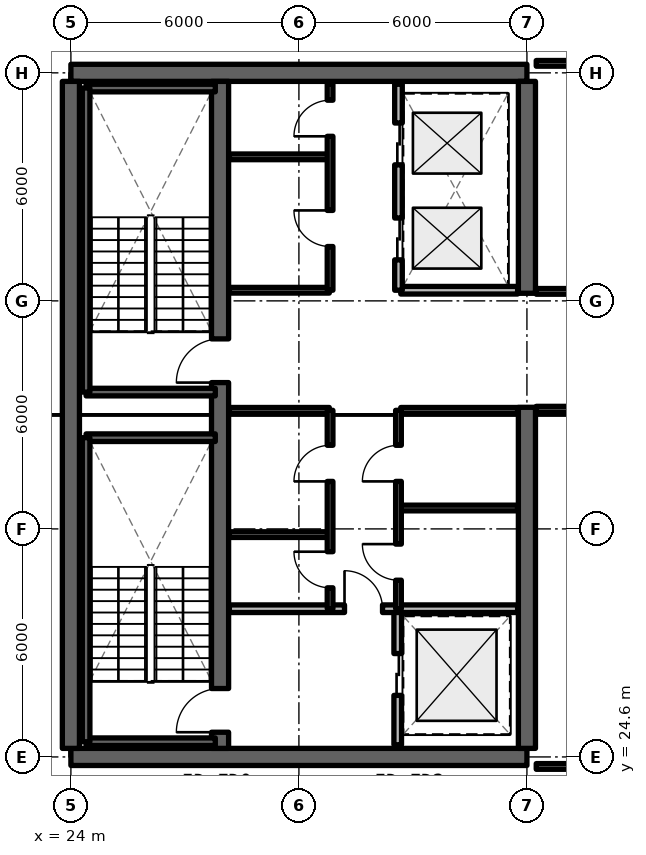
"""IFC4 building model, lengths in metres.
Left out: names, types, materials, properties, quantities, classifications, styles, units other than length and angle.
Written with IfcOpenShell. Run it as: python <this file> out.ifc"""

import sys

from ifc_helpers import new_model, si_unit, direction, frame, frame_2d, origin, place, context, subcontext, project, spatial, rectangle, extrude, element, fill, save


model = new_model("IFC4")
c1 = context("Model", 3, precision=1e-05, world=origin(), true_north=direction((0.0, 1.0)))
c2 = subcontext(c1, "Body", "Model", "MODEL_VIEW")
j1 = project(units=[si_unit("LENGTHUNIT", "METRE"), si_unit("PLANEANGLEUNIT", "RADIAN")], contexts=[c1])
p1 = place(None, origin())
s1 = spatial("IfcSite", under=j1, at=p1, CompositionType="ELEMENT")
p2 = place(p1, origin())
s2 = spatial("IfcBuilding", under=s1, at=p2, CompositionType="ELEMENT")
p3 = place(p2, frame((0.0, 0.0, 208.23)))
s3 = spatial("IfcBuildingStorey", under=s2, at=p3, CompositionType="ELEMENT", Elevation=208.23)
for number, where, z_axis, x_axis in (
    (1, (24.0, 24.6, 0.0), (0.0, 0.0, 1.0), (1.0, 0.0, 0.0)),
    (2, (36.0, 42.6, 0.0), (0.0, 0.0, 1.0), (-1.0, 0.0, 0.0)),
):
    element("IfcWall", number, at=place(p3, frame(where, z_axis=z_axis, x_axis=x_axis)), inside=s3, PredefinedType="SHEAR", context=c2, shape_type="SweptSolid", body=[
        extrude(rectangle(XDim=12.0, YDim=0.45, at=frame_2d((6.0, 0.0))), origin(), (0.0, 0.0, 1.0), 3.63),
    ])
p4 = place(p3, frame((24.0, 24.825, 0.0), z_axis=(0.0, 0.0, 1.0), x_axis=(0.0, 1.0, 0.0)))
e3 = element("IfcWall", 3, at=p4, inside=s3, PredefinedType="SHEAR", context=c2, shape_type="SweptSolid", body=[
    extrude(rectangle(XDim=17.55, YDim=0.45, at=frame_2d((8.775, 0.0))), origin(), (0.0, 0.0, 1.0), 3.63),
])
p5 = place(p3, frame((36.0, 24.825, 0.0), z_axis=(0.0, 0.0, 1.0), x_axis=(0.0, 1.0, 0.0)))
e4 = element("IfcWall", 4, at=p5, inside=s3, PredefinedType="SHEAR", context=c2, shape_type="SweptSolid", body=[
    extrude(rectangle(XDim=8.975, YDim=0.45, at=frame_2d((4.488, 0.0))), origin(), (0.0, 0.0, 1.0), 3.63),
])
p6 = place(p3, frame((36.0, 36.8, 0.0), z_axis=(0.0, 0.0, 1.0), x_axis=(0.0, 1.0, 0.0)))
e5 = element("IfcWall", 5, at=p6, inside=s3, PredefinedType="SHEAR", context=c2, shape_type="SweptSolid", body=[
    extrude(rectangle(XDim=5.575, YDim=0.45, at=frame_2d((2.788, 0.0))), origin(), (0.0, 0.0, 1.0), 3.63),
])
p7 = place(p3, frame((27.925, 24.825, 0.0), z_axis=(0.0, 0.0, 1.0), x_axis=(0.0, 1.0, 0.0)))
e6 = element("IfcWall", 6, at=p7, inside=s3, PredefinedType="SHEAR", context=c2, shape_type="SweptSolid", body=[
    extrude(rectangle(XDim=17.55, YDim=0.45, at=frame_2d((8.775, 0.0))), origin(), (0.0, 0.0, 1.0), 3.63),
])
p8 = place(p7, frame((0.425, 0.0, 0.0)))
e7 = element("IfcOpeningElement", 7, at=p8, cuts=e6, PredefinedType="OPENING", context=c2, shape_type="SweptSolid", body=[
    extrude(rectangle(XDim=1.15, YDim=2.15, at=frame_2d((0.575, 1.075))), frame((0.0, 0.235, 0.0), z_axis=(0.0, -1.0, 0.0), x_axis=(1.0, 0.0, 0.0)), (0.0, 0.0, 1.0), 0.47),
])
p9 = place(p7, frame((9.625, 0.0, 0.0)))
e8 = element("IfcOpeningElement", 8, at=p9, cuts=e6, PredefinedType="OPENING", context=c2, shape_type="SweptSolid", body=[
    extrude(rectangle(XDim=1.15, YDim=2.15, at=frame_2d((0.575, 1.075))), frame((0.0, 0.235, 0.0), z_axis=(0.0, -1.0, 0.0), x_axis=(1.0, 0.0, 0.0)), (0.0, 0.0, 1.0), 0.47),
])
p10 = place(p3, frame((32.6, 24.92, 0.0), z_axis=(0.0, 0.0, 1.0), x_axis=(0.0, 1.0, 0.0)))
e9 = element("IfcWall", 9, at=p10, inside=s3, PredefinedType="SOLIDWALL", context=c2, shape_type="SweptSolid", body=[
    extrude(rectangle(XDim=3.58, YDim=0.2, at=frame_2d((1.79, 0.0))), origin(), (0.0, 0.0, 1.0), 2.63),
])
p11 = place(p10, frame((1.3, 0.0, 0.0)))
e10 = element("IfcOpeningElement", 10, at=p11, cuts=e9, PredefinedType="OPENING", context=c2, shape_type="SweptSolid", body=[
    extrude(rectangle(XDim=1.1, YDim=2.2, at=frame_2d((0.55, 1.1))), frame((0.0, 0.11, 0.0), z_axis=(0.0, -1.0, 0.0), x_axis=(1.0, 0.0, 0.0)), (0.0, 0.0, 1.0), 0.22),
])
p12 = place(p3, frame((28.17, 28.5, 0.0), z_axis=(0.0, 0.0, 1.0), x_axis=(1.0, 0.0, 0.0)))
e11 = element("IfcWall", 11, at=p12, inside=s3, PredefinedType="SOLIDWALL", context=c2, shape_type="SweptSolid", body=[
    extrude(rectangle(XDim=7.585, YDim=0.2, at=frame_2d((3.792, 0.0))), origin(), (0.0, 0.0, 1.0), 2.63),
])
p13 = place(p12, frame((3.03, 0.0, 0.0)))
e12 = element("IfcOpeningElement", 12, at=p13, cuts=e11, PredefinedType="OPENING", context=c2, shape_type="SweptSolid", body=[
    extrude(rectangle(XDim=1.0, YDim=2.15, at=frame_2d((0.5, 1.075))), frame((0.0, 0.11, 0.0), z_axis=(0.0, -1.0, 0.0), x_axis=(1.0, 0.0, 0.0)), (0.0, 0.0, 1.0), 0.22),
])
for number, where, z_axis, x_axis in (
    (13, (28.17, 30.45, 0.0), (0.0, 0.0, 1.0), (1.0, 0.0, 0.0)),
    (14, (28.17, 33.72, 0.0), (0.0, 0.0, 1.0), (1.0, 0.0, 0.0)),
):
    element("IfcWall", number, at=place(p3, frame(where, z_axis=z_axis, x_axis=x_axis)), inside=s3, PredefinedType="SOLIDWALL", context=c2, shape_type="SweptSolid", body=[
        extrude(rectangle(XDim=2.63, YDim=0.15, at=frame_2d((1.315, 0.0))), origin(), (0.0, 0.0, 1.0), 2.63),
    ])
p14 = place(p3, frame((30.82, 28.5, 0.0), z_axis=(0.0, 0.0, 1.0), x_axis=(0.0, 1.0, 0.0)))
e15 = element("IfcWall", 15, at=p14, inside=s3, PredefinedType="SOLIDWALL", context=c2, shape_type="SweptSolid", body=[
    extrude(rectangle(XDim=5.22, YDim=0.15, at=frame_2d((2.61, 0.0))), origin(), (0.0, 0.0, 1.0), 2.63),
])
p15 = place(p14, frame((0.55, 0.0, 0.0)))
e16 = element("IfcOpeningElement", 16, at=p15, cuts=e15, PredefinedType="OPENING", context=c2, shape_type="SweptSolid", body=[
    extrude(rectangle(XDim=0.95, YDim=2.15, at=frame_2d((0.475, 1.075))), frame((0.0, 0.085, 0.0), z_axis=(0.0, -1.0, 0.0), x_axis=(1.0, 0.0, 0.0)), (0.0, 0.0, 1.0), 0.17),
])
p16 = place(p14, frame((3.35, 0.0, 0.0)))
e17 = element("IfcOpeningElement", 17, at=p16, cuts=e15, PredefinedType="OPENING", context=c2, shape_type="SweptSolid", body=[
    extrude(rectangle(XDim=0.95, YDim=2.15, at=frame_2d((0.475, 1.075))), frame((0.0, 0.085, 0.0), z_axis=(0.0, -1.0, 0.0), x_axis=(1.0, 0.0, 0.0)), (0.0, 0.0, 1.0), 0.17),
])
for number, where, z_axis, x_axis in (
    (18, (32.68, 31.15, 0.0), (0.0, 0.0, 1.0), (1.0, 0.0, 0.0)),
    (19, (32.68, 33.72, 0.0), (0.0, 0.0, 1.0), (1.0, 0.0, 0.0)),
):
    element("IfcWall", number, at=place(p3, frame(where, z_axis=z_axis, x_axis=x_axis)), inside=s3, PredefinedType="SOLIDWALL", context=c2, shape_type="SweptSolid", body=[
        extrude(rectangle(XDim=3.075, YDim=0.15, at=frame_2d((1.538, 0.0))), origin(), (0.0, 0.0, 1.0), 2.63),
    ])
p17 = place(p3, frame((32.62, 28.5, 0.0), z_axis=(0.0, 0.0, 1.0), x_axis=(0.0, 1.0, 0.0)))
e20 = element("IfcWall", 20, at=p17, inside=s3, PredefinedType="SOLIDWALL", context=c2, shape_type="SweptSolid", body=[
    extrude(rectangle(XDim=5.22, YDim=0.15, at=frame_2d((2.61, 0.0))), origin(), (0.0, 0.0, 1.0), 2.63),
])
p18 = place(p17, frame((0.75, 0.0, 0.0)))
e21 = element("IfcOpeningElement", 21, at=p18, cuts=e20, PredefinedType="OPENING", context=c2, shape_type="SweptSolid", body=[
    extrude(rectangle(XDim=0.95, YDim=2.15, at=frame_2d((0.475, 1.075))), frame((0.0, 0.085, 0.0), z_axis=(0.0, -1.0, 0.0), x_axis=(1.0, 0.0, 0.0)), (0.0, 0.0, 1.0), 0.17),
])
p19 = place(p17, frame((3.35, 0.0, 0.0)))
e22 = element("IfcOpeningElement", 22, at=p19, cuts=e20, PredefinedType="OPENING", context=c2, shape_type="SweptSolid", body=[
    extrude(rectangle(XDim=0.95, YDim=2.15, at=frame_2d((0.475, 1.075))), frame((0.0, 0.085, 0.0), z_axis=(0.0, -1.0, 0.0), x_axis=(1.0, 0.0, 0.0)), (0.0, 0.0, 1.0), 0.17),
])
for number, where, z_axis, x_axis in (
    (23, (28.17, 36.88, 0.0), (0.0, 0.0, 1.0), (1.0, 0.0, 0.0)),
    (24, (28.17, 40.39, 0.0), (0.0, 0.0, 1.0), (1.0, 0.0, 0.0)),
):
    element("IfcWall", number, at=place(p3, frame(where, z_axis=z_axis, x_axis=x_axis)), inside=s3, PredefinedType="SOLIDWALL", context=c2, shape_type="SweptSolid", body=[
        extrude(rectangle(XDim=2.63, YDim=0.15, at=frame_2d((1.315, 0.0))), origin(), (0.0, 0.0, 1.0), 2.63),
    ])
p20 = place(p3, frame((30.82, 36.88, 0.0), z_axis=(0.0, 0.0, 1.0), x_axis=(0.0, 1.0, 0.0)))
e25 = element("IfcWall", 25, at=p20, inside=s3, PredefinedType="SOLIDWALL", context=c2, shape_type="SweptSolid", body=[
    extrude(rectangle(XDim=5.42, YDim=0.15, at=frame_2d((2.71, 0.0))), origin(), (0.0, 0.0, 1.0), 2.63),
])
p21 = place(p20, frame((1.15, 0.0, 0.0)))
e26 = element("IfcOpeningElement", 26, at=p21, cuts=e25, PredefinedType="OPENING", context=c2, shape_type="SweptSolid", body=[
    extrude(rectangle(XDim=0.95, YDim=2.15, at=frame_2d((0.475, 1.075))), frame((0.0, 0.085, 0.0), z_axis=(0.0, -1.0, 0.0), x_axis=(1.0, 0.0, 0.0)), (0.0, 0.0, 1.0), 0.17),
])
p22 = place(p20, frame((4.05, 0.0, 0.0)))
e27 = element("IfcOpeningElement", 27, at=p22, cuts=e25, PredefinedType="OPENING", context=c2, shape_type="SweptSolid", body=[
    extrude(rectangle(XDim=0.95, YDim=2.15, at=frame_2d((0.475, 1.075))), frame((0.0, 0.085, 0.0), z_axis=(0.0, -1.0, 0.0), x_axis=(1.0, 0.0, 0.0)), (0.0, 0.0, 1.0), 0.17),
])
p23 = place(p3, frame((32.68, 36.88, 0.0), z_axis=(0.0, 0.0, 1.0), x_axis=(1.0, 0.0, 0.0)))
e28 = element("IfcWall", 28, at=p23, inside=s3, PredefinedType="SOLIDWALL", context=c2, shape_type="SweptSolid", body=[
    extrude(rectangle(XDim=3.075, YDim=0.2, at=frame_2d((1.538, 0.0))), origin(), (0.0, 0.0, 1.0), 2.63),
])
p24 = place(p3, frame((32.62, 36.88, 0.0), z_axis=(0.0, 0.0, 1.0), x_axis=(0.0, 1.0, 0.0)))
e29 = element("IfcWall", 29, at=p24, inside=s3, PredefinedType="SOLIDWALL", context=c2, shape_type="SweptSolid", body=[
    extrude(rectangle(XDim=5.42, YDim=0.2, at=frame_2d((2.71, 0.0))), origin(), (0.0, 0.0, 1.0), 2.63),
])
p25 = place(p24, frame((0.8, 0.0, 0.0)))
e30 = element("IfcOpeningElement", 30, at=p25, cuts=e29, PredefinedType="OPENING", context=c2, shape_type="SweptSolid", body=[
    extrude(rectangle(XDim=1.1, YDim=2.2, at=frame_2d((0.55, 1.1))), frame((0.0, 0.11, 0.0), z_axis=(0.0, -1.0, 0.0), x_axis=(1.0, 0.0, 0.0)), (0.0, 0.0, 1.0), 0.22),
])
p26 = place(p24, frame((3.3, 0.0, 0.0)))
e31 = element("IfcOpeningElement", 31, at=p26, cuts=e29, PredefinedType="OPENING", context=c2, shape_type="SweptSolid", body=[
    extrude(rectangle(XDim=1.1, YDim=2.2, at=frame_2d((0.55, 1.1))), frame((0.0, 0.11, 0.0), z_axis=(0.0, -1.0, 0.0), x_axis=(1.0, 0.0, 0.0)), (0.0, 0.0, 1.0), 0.22),
])
p27 = place(p3, frame((36.245, 24.35, 0.0), z_axis=(0.0, 0.0, 1.0), x_axis=(1.0, 0.0, 0.0)))
e32 = element("IfcWall", 32, at=p27, inside=s3, PredefinedType="SOLIDWALL", context=c2, shape_type="SweptSolid", body=[
    extrude(rectangle(XDim=7.905, YDim=0.15, at=frame_2d((3.952, 0.0))), origin(), (0.0, 0.0, 1.0), 2.63),
])
p28 = place(p3, frame((36.245, 33.75, 0.0), z_axis=(0.0, 0.0, 1.0), x_axis=(1.0, 0.0, 0.0)))
e33 = element("IfcWall", 33, at=p28, inside=s3, PredefinedType="SOLIDWALL", context=c2, shape_type="SweptSolid", body=[
    extrude(rectangle(XDim=7.905, YDim=0.15, at=frame_2d((3.952, 0.0))), origin(), (0.0, 0.0, 1.0), 2.63),
])
p29 = place(p28, frame((3.478, 0.0, 0.0)))
e34 = element("IfcOpeningElement", 34, at=p29, cuts=e33, PredefinedType="OPENING", context=c2, shape_type="SweptSolid", body=[
    extrude(rectangle(XDim=0.95, YDim=2.15, at=frame_2d((0.475, 1.075))), frame((0.0, 0.085, 0.0), z_axis=(0.0, -1.0, 0.0), x_axis=(1.0, 0.0, 0.0)), (0.0, 0.0, 1.0), 0.17),
])
p30 = place(p3, frame((36.245, 36.85, 0.0), z_axis=(0.0, 0.0, 1.0), x_axis=(1.0, 0.0, 0.0)))
e35 = element("IfcWall", 35, at=p30, inside=s3, PredefinedType="SOLIDWALL", context=c2, shape_type="SweptSolid", body=[
    extrude(rectangle(XDim=7.905, YDim=0.15, at=frame_2d((3.952, 0.0))), origin(), (0.0, 0.0, 1.0), 2.63),
])
p31 = place(p30, frame((3.478, 0.0, 0.0)))
e36 = element("IfcOpeningElement", 36, at=p31, cuts=e35, PredefinedType="OPENING", context=c2, shape_type="SweptSolid", body=[
    extrude(rectangle(XDim=0.95, YDim=2.15, at=frame_2d((0.475, 1.075))), frame((0.0, 0.085, 0.0), z_axis=(0.0, -1.0, 0.0), x_axis=(1.0, 0.0, 0.0)), (0.0, 0.0, 1.0), 0.17),
])
p32 = place(p3, frame((36.245, 42.85, 0.0), z_axis=(0.0, 0.0, 1.0), x_axis=(1.0, 0.0, 0.0)))
e37 = element("IfcWall", 37, at=p32, inside=s3, PredefinedType="SOLIDWALL", context=c2, shape_type="SweptSolid", body=[
    extrude(rectangle(XDim=7.905, YDim=0.15, at=frame_2d((3.952, 0.0))), origin(), (0.0, 0.0, 1.0), 2.63),
])
for number, where, z_axis, x_axis in (
    (38, (24.4, 25.0, 0.0), (0.0, 0.0, 1.0), (1.0, 0.0, 0.0)),
    (39, (27.8, 33.0, 0.0), (0.0, 0.0, 1.0), (-1.0, 0.0, 0.0)),
):
    element("IfcWall", number, at=place(p3, frame(where, z_axis=z_axis, x_axis=x_axis)), inside=s3, PredefinedType="SOLIDWALL", context=c2, shape_type="SweptSolid", body=[
        extrude(rectangle(XDim=3.4, YDim=0.2, at=frame_2d((1.7, 0.0))), origin(), (0.0, 0.0, 1.0), 3.63),
    ])
p33 = place(p3, frame((24.4, 33.0, 0.0), z_axis=(0.0, 0.0, 1.0), x_axis=(0.0, -1.0, 0.0)))
e40 = element("IfcWall", 40, at=p33, inside=s3, PredefinedType="SOLIDWALL", context=c2, shape_type="SweptSolid", body=[
    extrude(rectangle(XDim=8.0, YDim=0.2, at=frame_2d((4.0, 0.0))), origin(), (0.0, 0.0, 1.0), 3.63),
])
for number, where, z_axis, x_axis in (
    (41, (24.4, 34.2, 0.0), (0.0, 0.0, 1.0), (1.0, 0.0, 0.0)),
    (42, (27.8, 42.2, 0.0), (0.0, 0.0, 1.0), (-1.0, 0.0, 0.0)),
):
    element("IfcWall", number, at=place(p3, frame(where, z_axis=z_axis, x_axis=x_axis)), inside=s3, PredefinedType="SOLIDWALL", context=c2, shape_type="SweptSolid", body=[
        extrude(rectangle(XDim=3.4, YDim=0.2, at=frame_2d((1.7, 0.0))), origin(), (0.0, 0.0, 1.0), 3.63),
    ])
p34 = place(p3, frame((24.4, 42.2, 0.0), z_axis=(0.0, 0.0, 1.0), x_axis=(0.0, -1.0, 0.0)))
e43 = element("IfcWall", 43, at=p34, inside=s3, PredefinedType="SOLIDWALL", context=c2, shape_type="SweptSolid", body=[
    extrude(rectangle(XDim=8.0, YDim=0.2, at=frame_2d((4.0, 0.0))), origin(), (0.0, 0.0, 1.0), 3.63),
])
p35 = place(p11, origin())
e44 = element("IfcDoor", 44, at=p35, inside=s3, OperationType="SLIDING_TO_LEFT", PredefinedType="DOOR", context=c2, shape_type="SweptSolid", body=[
    extrude(rectangle(XDim=1.1, YDim=2.2, at=frame_2d((0.55, 1.1))), frame((0.0, 0.025, 0.0), z_axis=(0.0, -1.0, 0.0), x_axis=(1.0, 0.0, 0.0)), (0.0, 0.0, 1.0), 0.05),
])
fill(e10, e44)
p36 = place(p13, origin())
e45 = element("IfcDoor", 45, at=p36, inside=s3, OperationType="SINGLE_SWING_LEFT", PredefinedType="DOOR", context=c2, shape_type="SweptSolid", body=[
    extrude(rectangle(XDim=1.0, YDim=2.15, at=frame_2d((0.5, 1.075))), frame((0.0, 0.025, 0.0), z_axis=(0.0, -1.0, 0.0), x_axis=(1.0, 0.0, 0.0)), (0.0, 0.0, 1.0), 0.05),
])
fill(e12, e45)
p37 = place(p15, origin())
e46 = element("IfcDoor", 46, at=p37, inside=s3, OperationType="SINGLE_SWING_RIGHT", PredefinedType="DOOR", context=c2, shape_type="SweptSolid", body=[
    extrude(rectangle(XDim=0.95, YDim=2.15, at=frame_2d((0.475, 1.075))), frame((0.0, 0.025, 0.0), z_axis=(0.0, -1.0, 0.0), x_axis=(1.0, 0.0, 0.0)), (0.0, 0.0, 1.0), 0.05),
])
fill(e16, e46)
p38 = place(p16, origin())
e47 = element("IfcDoor", 47, at=p38, inside=s3, OperationType="SINGLE_SWING_LEFT", PredefinedType="DOOR", context=c2, shape_type="SweptSolid", body=[
    extrude(rectangle(XDim=0.95, YDim=2.15, at=frame_2d((0.475, 1.075))), frame((0.0, 0.025, 0.0), z_axis=(0.0, -1.0, 0.0), x_axis=(1.0, 0.0, 0.0)), (0.0, 0.0, 1.0), 0.05),
])
fill(e17, e47)
p39 = place(p18, origin())
e48 = element("IfcDoor", 48, at=p39, inside=s3, OperationType="SINGLE_SWING_RIGHT", PredefinedType="DOOR", context=c2, shape_type="SweptSolid", body=[
    extrude(rectangle(XDim=0.95, YDim=2.15, at=frame_2d((0.475, 1.075))), frame((0.0, 0.025, 0.0), z_axis=(0.0, -1.0, 0.0), x_axis=(1.0, 0.0, 0.0)), (0.0, 0.0, 1.0), 0.05),
])
fill(e21, e48)
p40 = place(p19, origin())
e49 = element("IfcDoor", 49, at=p40, inside=s3, OperationType="SINGLE_SWING_LEFT", PredefinedType="DOOR", context=c2, shape_type="SweptSolid", body=[
    extrude(rectangle(XDim=0.95, YDim=2.15, at=frame_2d((0.475, 1.075))), frame((0.0, 0.025, 0.0), z_axis=(0.0, -1.0, 0.0), x_axis=(1.0, 0.0, 0.0)), (0.0, 0.0, 1.0), 0.05),
])
fill(e22, e49)
p41 = place(p21, origin())
e50 = element("IfcDoor", 50, at=p41, inside=s3, OperationType="SINGLE_SWING_RIGHT", PredefinedType="DOOR", context=c2, shape_type="SweptSolid", body=[
    extrude(rectangle(XDim=0.95, YDim=2.15, at=frame_2d((0.475, 1.075))), frame((0.0, 0.025, 0.0), z_axis=(0.0, -1.0, 0.0), x_axis=(1.0, 0.0, 0.0)), (0.0, 0.0, 1.0), 0.05),
])
fill(e26, e50)
p42 = place(p22, origin())
e51 = element("IfcDoor", 51, at=p42, inside=s3, OperationType="SINGLE_SWING_LEFT", PredefinedType="DOOR", context=c2, shape_type="SweptSolid", body=[
    extrude(rectangle(XDim=0.95, YDim=2.15, at=frame_2d((0.475, 1.075))), frame((0.0, 0.025, 0.0), z_axis=(0.0, -1.0, 0.0), x_axis=(1.0, 0.0, 0.0)), (0.0, 0.0, 1.0), 0.05),
])
fill(e27, e51)
p43 = place(p25, origin())
e52 = element("IfcDoor", 52, at=p43, inside=s3, OperationType="SLIDING_TO_LEFT", PredefinedType="DOOR", context=c2, shape_type="SweptSolid", body=[
    extrude(rectangle(XDim=1.1, YDim=2.2, at=frame_2d((0.55, 1.1))), frame((0.0, 0.025, 0.0), z_axis=(0.0, -1.0, 0.0), x_axis=(1.0, 0.0, 0.0)), (0.0, 0.0, 1.0), 0.05),
])
fill(e30, e52)
p44 = place(p26, origin())
e53 = element("IfcDoor", 53, at=p44, inside=s3, OperationType="SLIDING_TO_RIGHT", PredefinedType="DOOR", context=c2, shape_type="SweptSolid", body=[
    extrude(rectangle(XDim=1.1, YDim=2.2, at=frame_2d((0.55, 1.1))), frame((0.0, 0.025, 0.0), z_axis=(0.0, -1.0, 0.0), x_axis=(1.0, 0.0, 0.0)), (0.0, 0.0, 1.0), 0.05),
])
fill(e31, e53)
p45 = place(p8, origin())
e54 = element("IfcDoor", 54, at=p45, inside=s3, OperationType="SINGLE_SWING_LEFT", PredefinedType="DOOR", context=c2, shape_type="SweptSolid", body=[
    extrude(rectangle(XDim=1.15, YDim=2.15, at=frame_2d((0.575, 1.075))), frame((0.0, 0.025, 0.0), z_axis=(0.0, -1.0, 0.0), x_axis=(1.0, 0.0, 0.0)), (0.0, 0.0, 1.0), 0.05),
])
fill(e7, e54)
p46 = place(p9, origin())
e55 = element("IfcDoor", 55, at=p46, inside=s3, OperationType="SINGLE_SWING_RIGHT", PredefinedType="DOOR", context=c2, shape_type="SweptSolid", body=[
    extrude(rectangle(XDim=1.15, YDim=2.15, at=frame_2d((0.575, 1.075))), frame((0.0, 0.025, 0.0), z_axis=(0.0, -1.0, 0.0), x_axis=(1.0, 0.0, 0.0)), (0.0, 0.0, 1.0), 0.05),
])
fill(e8, e55)
save(model, sys.argv[1])
